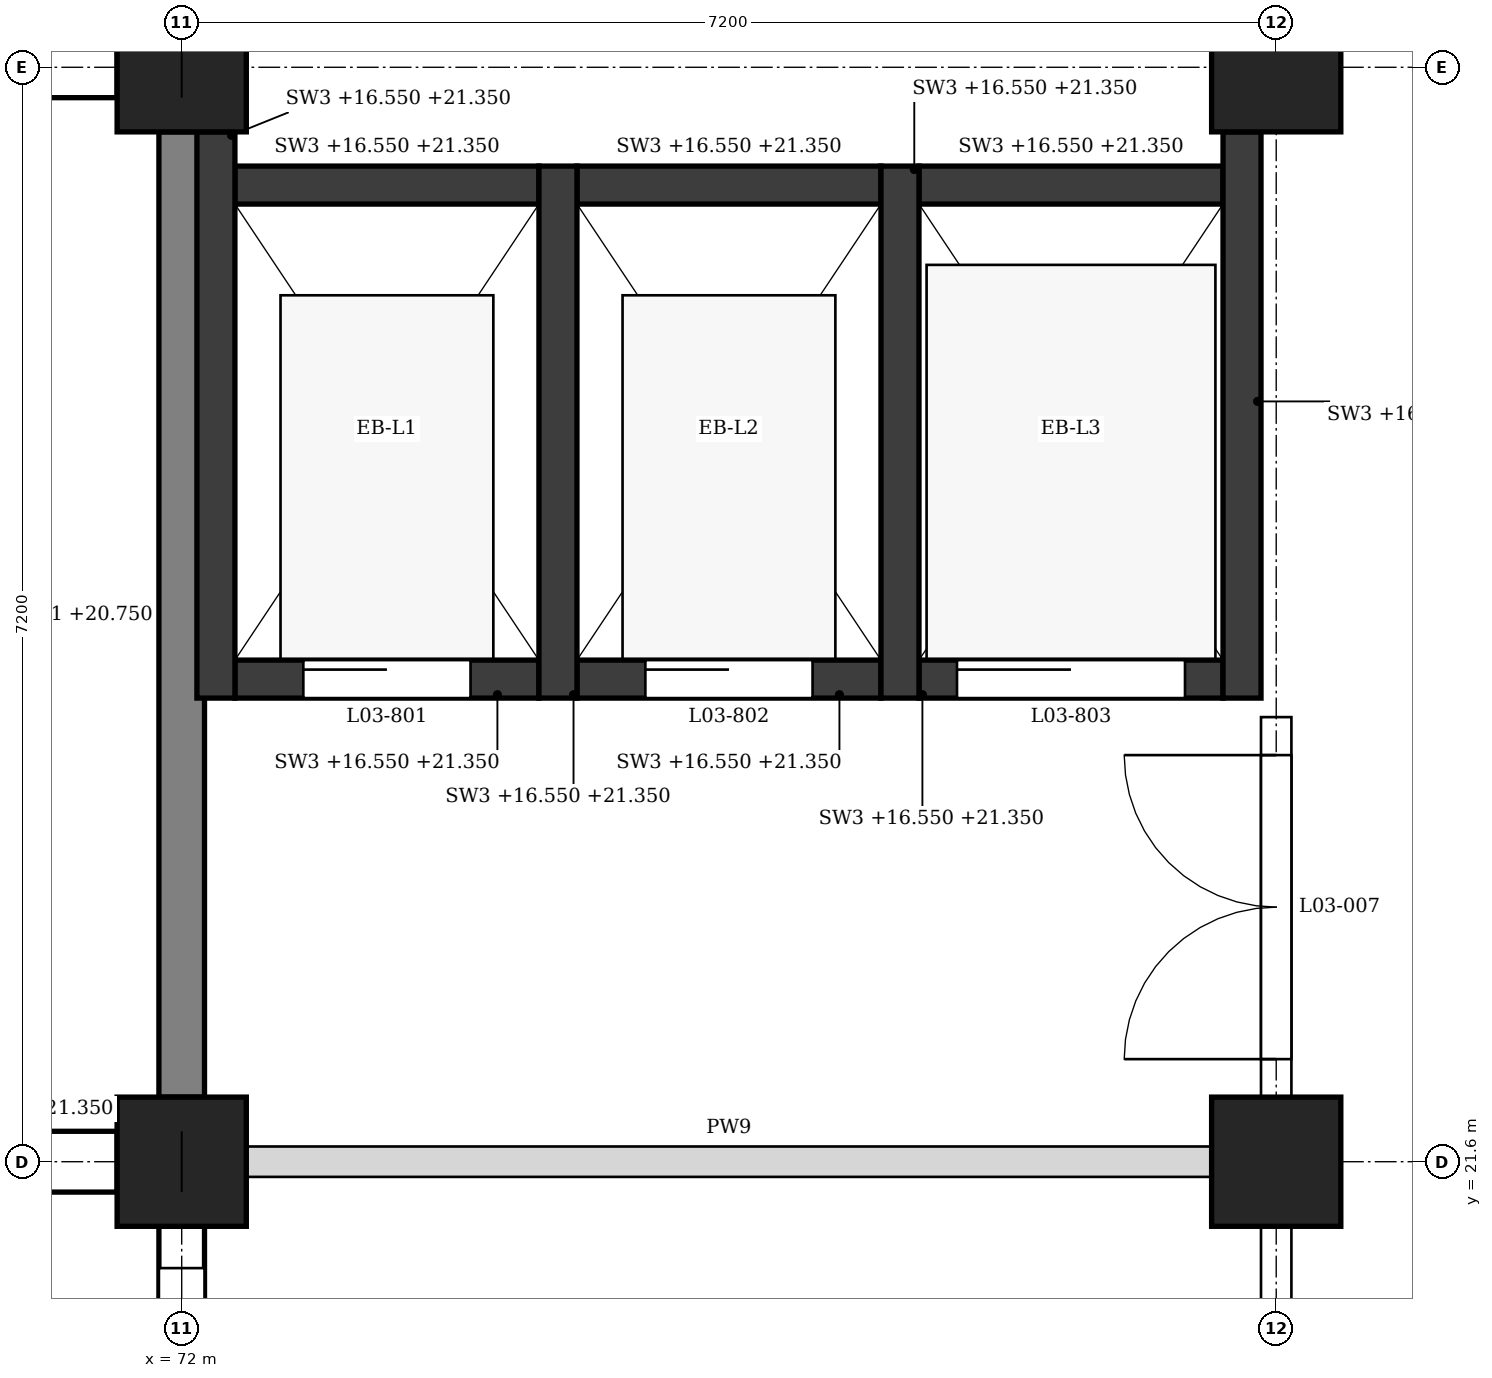
"""IFC4 building model, lengths in metres.
Left out: names, types, materials, properties, quantities, classifications, styles, units other than length and angle.
Written with IfcOpenShell. Run it as: python <this file> out.ifc"""

import sys

from ifc_helpers import new_model, si_unit, direction, frame, frame_2d, origin, origin_2d, place, context, subcontext, project, spatial, polyline, rectangle, outline, extrude, element, fill, save


model = new_model("IFC4")
c1 = context("Model", 3, precision=1e-05, world=origin(), true_north=direction((0.0, 1.0)))
c2 = subcontext(c1, "Body", "Model", "MODEL_VIEW")
j1 = project(units=[si_unit("LENGTHUNIT", "METRE"), si_unit("PLANEANGLEUNIT", "RADIAN")], contexts=[c1])
p1 = place(None, origin())
s1 = spatial("IfcSite", under=j1, at=p1, CompositionType="ELEMENT")
p2 = place(p1, origin())
s2 = spatial("IfcBuilding", under=s1, at=p2, CompositionType="ELEMENT")
p3 = place(p2, frame((0.0, 0.0, 16.8)))
s3 = spatial("IfcBuildingStorey", under=s2, at=p3, CompositionType="ELEMENT", Elevation=16.8)
for number, where, z_axis, x_axis in (
    (1, (72.0, 21.6, 0.0), (0.0, 0.0, 1.0), (1.0, 0.0, 0.0)),
    (2, (72.0, 28.8, 0.0), (0.0, 0.0, 1.0), (1.0, 0.0, 0.0)),
    (3, (79.2, 21.6, 0.0), (0.0, 0.0, 1.0), (1.0, 0.0, 0.0)),
    (4, (79.2, 28.8, 0.0), (0.0, 0.0, 1.0), (1.0, 0.0, 0.0)),
):
    element("IfcColumn", number, at=place(p3, frame(where, z_axis=z_axis, x_axis=x_axis)), inside=s3, PredefinedType="COLUMN", context=c2, shape_type="SweptSolid", body=[
        extrude(rectangle(XDim=0.85, YDim=0.85, at=origin_2d()), origin(), (0.0, 0.0, 1.0), 4.8),
    ])
p4 = place(p3, frame((72.0, 14.825, 0.0), z_axis=(0.0, 0.0, 1.0), x_axis=(0.0, 1.0, 0.0)))
e5 = element("IfcWall", 5, at=p4, inside=s3, PredefinedType="STANDARD", context=c2, shape_type="SweptSolid", body=[
    extrude(rectangle(XDim=6.35, YDim=0.3, at=frame_2d((3.175, 0.0))), origin(), (0.0, 0.0, 1.0), 3.95),
])
p5 = place(p4, frame((0.275, 0.0, 0.9)))
e6 = element("IfcOpeningElement", 6, at=p5, cuts=e5, PredefinedType="OPENING", context=c2, shape_type="SweptSolid", body=[
    extrude(outline(polyline([(0.0, 0.0), (5.8, 0.0), (5.8, 1.0), (2.9, 2.5), (0.0, 1.0), (0.0, 0.0)])), frame((0.0, 0.16, 0.0), z_axis=(0.0, -1.0, 0.0), x_axis=(1.0, 0.0, 0.0)), (0.0, 0.0, 1.0), 0.32),
])
p6 = place(p3, frame((72.0, 22.025, 0.0), z_axis=(0.0, 0.0, 1.0), x_axis=(0.0, 1.0, 0.0)))
e7 = element("IfcWall", 7, at=p6, inside=s3, PredefinedType="STANDARD", context=c2, shape_type="SweptSolid", body=[
    extrude(rectangle(XDim=6.35, YDim=0.3, at=frame_2d((3.175, 0.0))), origin(), (0.0, 0.0, 1.0), 3.95),
])
for number, where, z_axis, x_axis in (
    (8, (71.575, 21.6, 0.0), (0.0, 0.0, 1.0), (-1.0, 0.0, 0.0)),
    (9, (71.575, 28.8, 0.0), (0.0, 0.0, 1.0), (-1.0, 0.0, 0.0)),
):
    element("IfcWall", number, at=place(p3, frame(where, z_axis=z_axis, x_axis=x_axis)), inside=s3, PredefinedType="POLYGONAL", context=c2, shape_type="SweptSolid", body=[
        extrude(outline(polyline([(0.6, 0.0), (0.6, 4.55), (0.0, 4.55), (0.0, 0.0), (0.6, 0.0)])), frame((0.0, 0.2, 0.0), z_axis=(0.0, -1.0, 0.0), x_axis=(1.0, 0.0, 0.0)), (0.0, 0.0, 1.0), 0.4),
    ])
p7 = place(p3, frame((72.225, 24.65, -0.25), z_axis=(0.0, 0.0, 1.0), x_axis=(0.0, 1.0, 0.0)))
e10 = element("IfcWall", 10, at=p7, inside=s3, PredefinedType="SHEAR", context=c2, shape_type="SweptSolid", body=[
    extrude(rectangle(XDim=3.725, YDim=0.25, at=frame_2d((1.863, 0.0))), origin(), (0.0, 0.0, 1.0), 4.8),
])
for number, where, z_axis, x_axis in (
    (11, (74.475, 24.65, -0.25), (0.0, 0.0, 1.0), (0.0, 1.0, 0.0)),
    (12, (76.725, 24.65, -0.25), (0.0, 0.0, 1.0), (0.0, 1.0, 0.0)),
):
    element("IfcWall", number, at=place(p3, frame(where, z_axis=z_axis, x_axis=x_axis)), inside=s3, PredefinedType="SHEAR", context=c2, shape_type="SweptSolid", body=[
        extrude(rectangle(XDim=3.5, YDim=0.25, at=frame_2d((1.75, 0.0))), origin(), (0.0, 0.0, 1.0), 4.8),
    ])
p8 = place(p3, frame((78.975, 24.65, -0.25), z_axis=(0.0, 0.0, 1.0), x_axis=(0.0, 1.0, 0.0)))
e13 = element("IfcWall", 13, at=p8, inside=s3, PredefinedType="SHEAR", context=c2, shape_type="SweptSolid", body=[
    extrude(rectangle(XDim=3.725, YDim=0.25, at=frame_2d((1.863, 0.0))), origin(), (0.0, 0.0, 1.0), 4.8),
])
p9 = place(p3, frame((72.35, 24.775, -0.25), z_axis=(0.0, 0.0, 1.0), x_axis=(1.0, 0.0, 0.0)))
e14 = element("IfcWall", 14, at=p9, inside=s3, PredefinedType="SHEAR", context=c2, shape_type="SweptSolid", body=[
    extrude(rectangle(XDim=2.0, YDim=0.25, at=frame_2d((1.0, 0.0))), origin(), (0.0, 0.0, 1.0), 4.8),
])
p10 = place(p9, frame((0.45, 0.0, 0.25)))
e15 = element("IfcOpeningElement", 15, at=p10, cuts=e14, PredefinedType="OPENING", context=c2, shape_type="SweptSolid", body=[
    extrude(rectangle(XDim=1.1, YDim=2.1, at=frame_2d((0.55, 1.05))), frame((0.0, 0.135, 0.0), z_axis=(0.0, -1.0, 0.0), x_axis=(1.0, 0.0, 0.0)), (0.0, 0.0, 1.0), 0.27),
])
p11 = place(p3, frame((72.35, 28.025, -0.25), z_axis=(0.0, 0.0, 1.0), x_axis=(1.0, 0.0, 0.0)))
e16 = element("IfcWall", 16, at=p11, inside=s3, PredefinedType="SHEAR", context=c2, shape_type="SweptSolid", body=[
    extrude(rectangle(XDim=2.0, YDim=0.25, at=frame_2d((1.0, 0.0))), origin(), (0.0, 0.0, 1.0), 4.8),
])
p12 = place(p3, frame((74.6, 24.775, -0.25), z_axis=(0.0, 0.0, 1.0), x_axis=(1.0, 0.0, 0.0)))
e17 = element("IfcWall", 17, at=p12, inside=s3, PredefinedType="SHEAR", context=c2, shape_type="SweptSolid", body=[
    extrude(rectangle(XDim=2.0, YDim=0.25, at=frame_2d((1.0, 0.0))), origin(), (0.0, 0.0, 1.0), 4.8),
])
p13 = place(p12, frame((0.45, 0.0, 0.25)))
e18 = element("IfcOpeningElement", 18, at=p13, cuts=e17, PredefinedType="OPENING", context=c2, shape_type="SweptSolid", body=[
    extrude(rectangle(XDim=1.1, YDim=2.1, at=frame_2d((0.55, 1.05))), frame((0.0, 0.135, 0.0), z_axis=(0.0, -1.0, 0.0), x_axis=(1.0, 0.0, 0.0)), (0.0, 0.0, 1.0), 0.27),
])
p14 = place(p3, frame((74.6, 28.025, -0.25), z_axis=(0.0, 0.0, 1.0), x_axis=(1.0, 0.0, 0.0)))
e19 = element("IfcWall", 19, at=p14, inside=s3, PredefinedType="SHEAR", context=c2, shape_type="SweptSolid", body=[
    extrude(rectangle(XDim=2.0, YDim=0.25, at=frame_2d((1.0, 0.0))), origin(), (0.0, 0.0, 1.0), 4.8),
])
p15 = place(p3, frame((76.85, 24.775, -0.25), z_axis=(0.0, 0.0, 1.0), x_axis=(1.0, 0.0, 0.0)))
e20 = element("IfcWall", 20, at=p15, inside=s3, PredefinedType="SHEAR", context=c2, shape_type="SweptSolid", body=[
    extrude(rectangle(XDim=2.0, YDim=0.25, at=frame_2d((1.0, 0.0))), origin(), (0.0, 0.0, 1.0), 4.8),
])
p16 = place(p15, frame((0.25, 0.0, 0.25)))
e21 = element("IfcOpeningElement", 21, at=p16, cuts=e20, PredefinedType="OPENING", context=c2, shape_type="SweptSolid", body=[
    extrude(rectangle(XDim=1.5, YDim=2.1, at=frame_2d((0.75, 1.05))), frame((0.0, 0.135, 0.0), z_axis=(0.0, -1.0, 0.0), x_axis=(1.0, 0.0, 0.0)), (0.0, 0.0, 1.0), 0.27),
])
p17 = place(p3, frame((76.85, 28.025, -0.25), z_axis=(0.0, 0.0, 1.0), x_axis=(1.0, 0.0, 0.0)))
e22 = element("IfcWall", 22, at=p17, inside=s3, PredefinedType="SHEAR", context=c2, shape_type="SweptSolid", body=[
    extrude(rectangle(XDim=2.0, YDim=0.25, at=frame_2d((1.0, 0.0))), origin(), (0.0, 0.0, 1.0), 4.8),
])
p18 = place(p3, frame((72.425, 21.6, 0.0), z_axis=(0.0, 0.0, 1.0), x_axis=(1.0, 0.0, 0.0)))
e23 = element("IfcWall", 23, at=p18, inside=s3, PredefinedType="PARTITIONING", context=c2, shape_type="SweptSolid", body=[
    extrude(rectangle(XDim=6.35, YDim=0.2, at=frame_2d((3.175, 0.0))), origin(), (0.0, 0.0, 1.0), 3.8),
])
p19 = place(p3, frame((79.2, 14.825, 0.0), z_axis=(0.0, 0.0, 1.0), x_axis=(0.0, 1.0, 0.0)))
e24 = element("IfcWall", 24, at=p19, inside=s3, PredefinedType="PARTITIONING", context=c2, shape_type="SweptSolid", body=[
    extrude(rectangle(XDim=6.35, YDim=0.2, at=frame_2d((3.175, 0.0))), origin(), (0.0, 0.0, 1.0), 3.8),
])
p20 = place(p19, frame((2.175, 0.0, 0.0)))
e25 = element("IfcOpeningElement", 25, at=p20, cuts=e24, PredefinedType="OPENING", context=c2, shape_type="SweptSolid", body=[
    extrude(rectangle(XDim=2.0, YDim=2.1, at=frame_2d((1.0, 1.05))), frame((0.0, 0.11, 0.0), z_axis=(0.0, -1.0, 0.0), x_axis=(1.0, 0.0, 0.0)), (0.0, 0.0, 1.0), 0.22),
])
p21 = place(p3, frame((79.2, 22.025, 0.0), z_axis=(0.0, 0.0, 1.0), x_axis=(0.0, 1.0, 0.0)))
e26 = element("IfcWall", 26, at=p21, inside=s3, PredefinedType="PARTITIONING", context=c2, shape_type="SweptSolid", body=[
    extrude(rectangle(XDim=2.5, YDim=0.2, at=frame_2d((1.25, 0.0))), origin(), (0.0, 0.0, 1.0), 3.8),
])
p22 = place(p21, frame((0.25, 0.0, 0.0)))
e27 = element("IfcOpeningElement", 27, at=p22, cuts=e26, PredefinedType="OPENING", context=c2, shape_type="SweptSolid", body=[
    extrude(rectangle(XDim=2.0, YDim=2.4, at=frame_2d((1.0, 1.2))), frame((0.0, 0.11, 0.0), z_axis=(0.0, -1.0, 0.0), x_axis=(1.0, 0.0, 0.0)), (0.0, 0.0, 1.0), 0.22),
])
p23 = place(p5, origin())
e28 = element("IfcWindow", 28, at=p23, inside=s3, PartitioningType="TRIPLE_PANEL_VERTICAL", PredefinedType="WINDOW", context=c2, shape_type="SweptSolid", body=[
    extrude(outline(polyline([(0.0, 0.0), (5.8, 0.0), (5.8, 1.0), (2.9, 2.5), (0.0, 1.0), (0.0, 0.0)])), frame((0.0, 0.03, 0.0), z_axis=(0.0, -1.0, 0.0), x_axis=(1.0, 0.0, 0.0)), (0.0, 0.0, 1.0), 0.06),
])
fill(e6, e28)
p24 = place(p10, origin())
e29 = element("IfcDoor", 29, at=p24, inside=s3, OperationType="SLIDING_TO_LEFT", PredefinedType="DOOR", context=c2, shape_type="SweptSolid", body=[
    extrude(rectangle(XDim=1.1, YDim=2.1, at=frame_2d((0.55, 1.05))), frame((0.0, 0.025, 0.0), z_axis=(0.0, -1.0, 0.0), x_axis=(1.0, 0.0, 0.0)), (0.0, 0.0, 1.0), 0.05),
])
fill(e15, e29)
p25 = place(p13, origin())
e30 = element("IfcDoor", 30, at=p25, inside=s3, OperationType="SLIDING_TO_LEFT", PredefinedType="DOOR", context=c2, shape_type="SweptSolid", body=[
    extrude(rectangle(XDim=1.1, YDim=2.1, at=frame_2d((0.55, 1.05))), frame((0.0, 0.025, 0.0), z_axis=(0.0, -1.0, 0.0), x_axis=(1.0, 0.0, 0.0)), (0.0, 0.0, 1.0), 0.05),
])
fill(e18, e30)
p26 = place(p16, origin())
e31 = element("IfcDoor", 31, at=p26, inside=s3, OperationType="SLIDING_TO_LEFT", PredefinedType="DOOR", context=c2, shape_type="SweptSolid", body=[
    extrude(rectangle(XDim=1.5, YDim=2.1, at=frame_2d((0.75, 1.05))), frame((0.0, 0.025, 0.0), z_axis=(0.0, -1.0, 0.0), x_axis=(1.0, 0.0, 0.0)), (0.0, 0.0, 1.0), 0.05),
])
fill(e21, e31)
p27 = place(p22, origin())
e32 = element("IfcDoor", 32, at=p27, inside=s3, OperationType="DOUBLE_DOOR_SINGLE_SWING", PredefinedType="DOOR", context=c2, shape_type="SweptSolid", body=[
    extrude(rectangle(XDim=2.0, YDim=2.4, at=frame_2d((1.0, 1.2))), frame((0.0, 0.025, 0.0), z_axis=(0.0, -1.0, 0.0), x_axis=(1.0, 0.0, 0.0)), (0.0, 0.0, 1.0), 0.05),
])
fill(e27, e32)
save(model, sys.argv[1])
